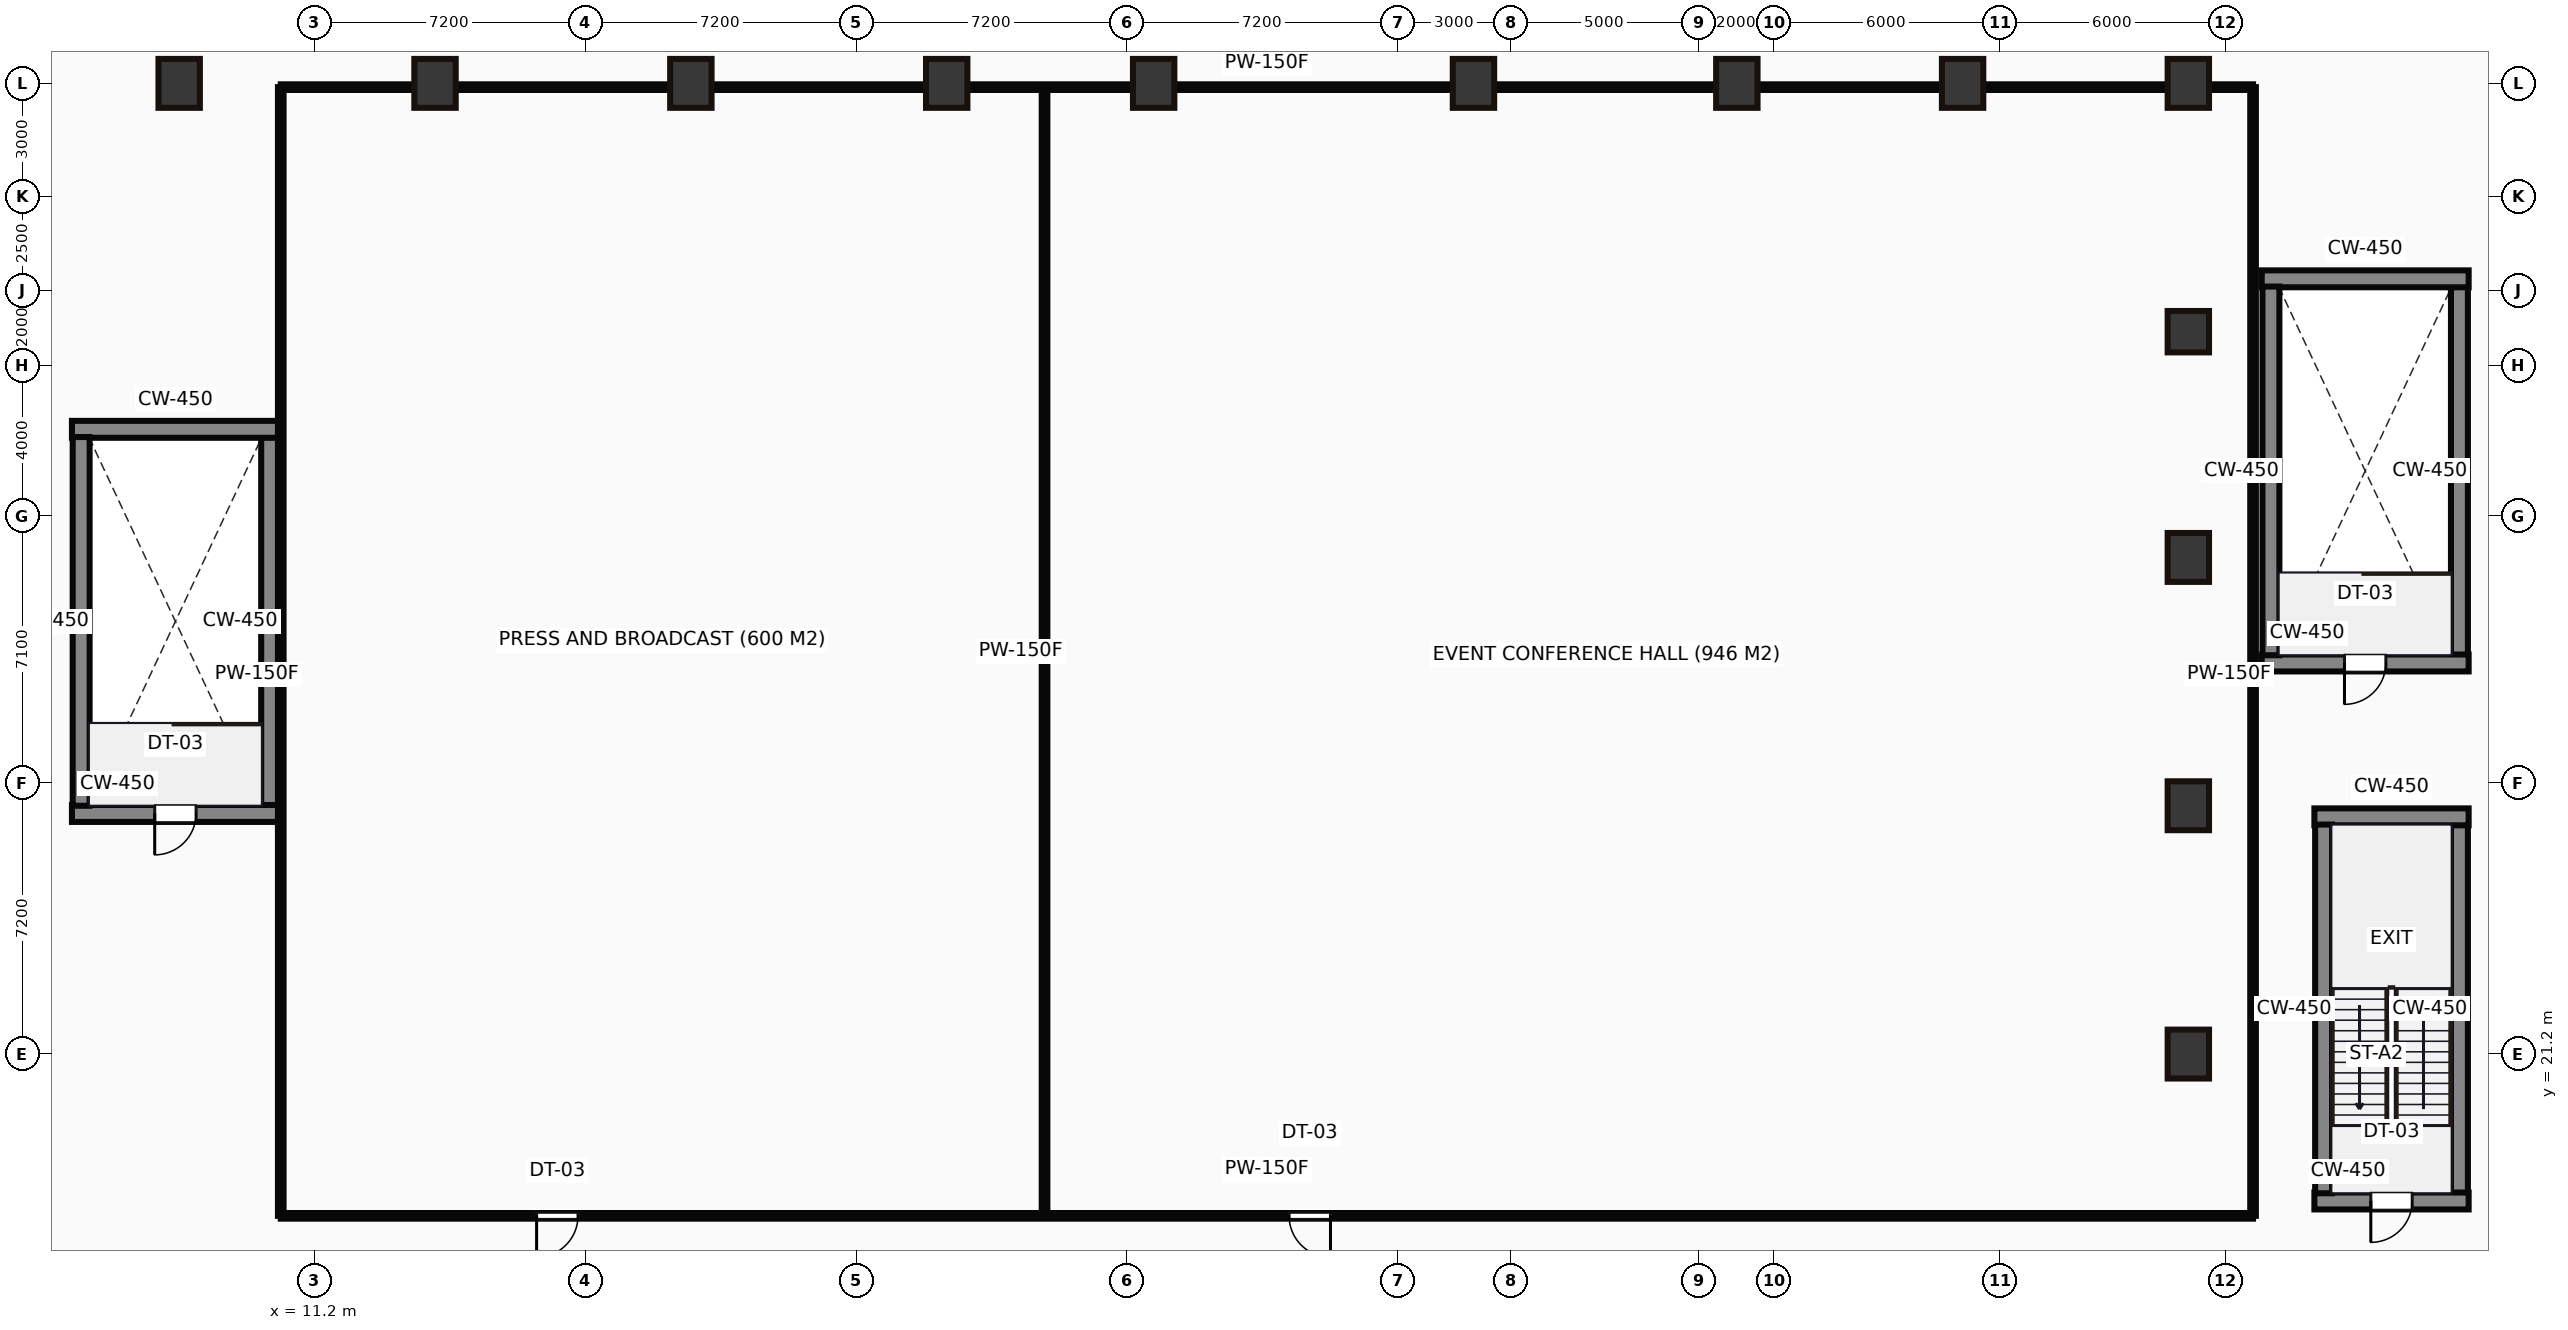
"""IFC4 building model, lengths in metres.
Left out: names, types, materials, properties, quantities, classifications, styles, units other than length and angle.
Written with IfcOpenShell. Run it as: python <this file> out.ifc"""

import sys

from ifc_helpers import new_model, si_unit, direction, frame, frame_2d, origin, origin_2d, place, context, subcontext, project, spatial, rectangle, hollow_rectangle, extrude, source, transform, mapped, element, fill, save


model = new_model("IFC4")
c1 = context("Model", 3, precision=1e-05, world=origin(), true_north=direction((0.0, 1.0)))
c2 = subcontext(c1, "Body", "Model", "MODEL_VIEW")
j1 = project(units=[si_unit("LENGTHUNIT", "METRE"), si_unit("PLANEANGLEUNIT", "RADIAN")], contexts=[c1])
p1 = place(None, origin())
s1 = spatial("IfcSite", under=j1, at=p1, CompositionType="ELEMENT")
p2 = place(p1, origin())
s2 = spatial("IfcBuilding", under=s1, at=p2, CompositionType="ELEMENT")
p3 = place(p2, frame((0.0, 0.0, 21.0)))
s3 = spatial("IfcBuildingStorey", under=s2, at=p3, CompositionType="ELEMENT", Elevation=21.0)
m1 = source(origin(), c2, "Body", "SweptSolid", [
    extrude(hollow_rectangle(XDim=1.1, YDim=1.3, WallThickness=0.055, at=origin_2d()), origin(), (0.0, 0.0, 1.0), 5.0),
])
for number, where, z_axis, x_axis in (
    (1, (7.6, 47.0, 0.0), (0.0, 0.0, 1.0), (1.0, 0.0, 0.0)),
    (2, (14.4, 47.0, 0.0), (0.0, 0.0, 1.0), (1.0, 0.0, 0.0)),
    (3, (21.2, 47.0, 0.0), (0.0, 0.0, 1.0), (1.0, 0.0, 0.0)),
    (4, (28.0, 47.0, 0.0), (0.0, 0.0, 1.0), (1.0, 0.0, 0.0)),
    (5, (33.5, 47.0, 0.0), (0.0, 0.0, 1.0), (1.0, 0.0, 0.0)),
    (6, (42.0, 47.0, 0.0), (0.0, 0.0, 1.0), (1.0, 0.0, 0.0)),
    (7, (49.0, 47.0, 0.0), (0.0, 0.0, 1.0), (1.0, 0.0, 0.0)),
    (8, (55.0, 47.0, 0.0), (0.0, 0.0, 1.0), (1.0, 0.0, 0.0)),
    (9, (61.0, 47.0, 0.0), (0.0, 0.0, 1.0), (1.0, 0.0, 0.0)),
    (10, (61.0, 21.2, 0.0), (0.0, 0.0, 1.0), (1.0, 0.0, 0.0)),
    (11, (61.0, 27.8, 0.0), (0.0, 0.0, 1.0), (1.0, 0.0, 0.0)),
    (12, (61.0, 34.4, 0.0), (0.0, 0.0, 1.0), (1.0, 0.0, 0.0)),
):
    element("IfcColumn", number, at=place(p3, frame(where, z_axis=z_axis, x_axis=x_axis)), inside=s3, PredefinedType="PILASTER", context=c2, shape_type="MappedRepresentation", body=[
        mapped(m1, transform((0.0, 0.0, 0.0))),
    ])
m2 = source(origin(), c2, "Body", "SweptSolid", [
    extrude(hollow_rectangle(XDim=1.1, YDim=1.1, WallThickness=0.05, at=origin_2d()), origin(), (0.0, 0.0, 1.0), 5.0),
])
p4 = place(p3, frame((61.0, 40.4, 0.0), z_axis=(0.0, 0.0, 1.0), x_axis=(1.0, 0.0, 0.0)))
e13 = element("IfcColumn", 13, at=p4, inside=s3, PredefinedType="PILASTER", context=c2, shape_type="MappedRepresentation", body=[
    mapped(m2, transform((0.0, 0.0, 0.0))),
])
m3 = source(origin(), c2, "Body", "SweptSolid", [
    extrude(rectangle(XDim=4.1, YDim=0.45, at=frame_2d((2.05, 0.0))), origin(), (0.0, 0.0, 1.0), 5.0),
])
p5 = place(p3, frame((64.35, 17.295, 0.0), z_axis=(0.0, 0.0, 1.0), x_axis=(1.0, 0.0, 0.0)))
e14 = element("IfcWall", 14, at=p5, inside=s3, PredefinedType="SHEAR", context=c2, shape_type="MappedRepresentation", body=[
    mapped(m3, transform((0.0, 0.0, 0.0))),
])
p6 = place(p5, frame((1.5, 0.0, 0.0)))
e15 = element("IfcOpeningElement", 15, at=p6, cuts=e14, PredefinedType="OPENING", context=c2, shape_type="SweptSolid", body=[
    extrude(rectangle(XDim=1.1, YDim=2.15, at=frame_2d((0.55, 1.075))), frame((0.0, 0.235, 0.0), z_axis=(0.0, -1.0, 0.0), x_axis=(1.0, 0.0, 0.0)), (0.0, 0.0, 1.0), 0.47),
])
m4 = source(origin(), c2, "Body", "SweptSolid", [
    extrude(rectangle(XDim=9.8, YDim=0.45, at=frame_2d((4.9, 0.0))), origin(), (0.0, 0.0, 1.0), 5.0),
])
for number, where, z_axis, x_axis in (
    (16, (64.595, 17.5, 0.0), (0.0, 0.0, 1.0), (0.0, 1.0, 0.0)),
    (17, (68.205, 17.5, 0.0), (0.0, 0.0, 1.0), (0.0, 1.0, 0.0)),
):
    element("IfcWall", number, at=place(p3, frame(where, z_axis=z_axis, x_axis=x_axis)), inside=s3, PredefinedType="SHEAR", context=c2, shape_type="MappedRepresentation", body=[
        mapped(m4, transform((0.0, 0.0, 0.0))),
    ])
p7 = place(p3, frame((64.35, 27.505, 0.0), z_axis=(0.0, 0.0, 1.0), x_axis=(1.0, 0.0, 0.0)))
e18 = element("IfcWall", 18, at=p7, inside=s3, PredefinedType="SHEAR", context=c2, shape_type="MappedRepresentation", body=[
    mapped(m3, transform((0.0, 0.0, 0.0))),
])
m5 = source(origin(), c2, "Body", "SweptSolid", [
    extrude(rectangle(XDim=5.5, YDim=0.45, at=frame_2d((2.75, 0.0))), origin(), (0.0, 0.0, 1.0), 4.7),
])
p8 = place(p3, frame((4.75, 27.595, 0.0), z_axis=(0.0, 0.0, 1.0), x_axis=(1.0, 0.0, 0.0)))
e19 = element("IfcWall", 19, at=p8, inside=s3, PredefinedType="SHEAR", context=c2, shape_type="MappedRepresentation", body=[
    mapped(m5, transform((0.0, 0.0, 0.0))),
])
p9 = place(p8, frame((2.2, 0.0, 0.0)))
e20 = element("IfcOpeningElement", 20, at=p9, cuts=e19, PredefinedType="OPENING", context=c2, shape_type="SweptSolid", body=[
    extrude(rectangle(XDim=1.1, YDim=2.15, at=frame_2d((0.55, 1.075))), frame((0.0, 0.235, 0.0), z_axis=(0.0, -1.0, 0.0), x_axis=(1.0, 0.0, 0.0)), (0.0, 0.0, 1.0), 0.47),
])
m6 = source(origin(), c2, "Body", "SweptSolid", [
    extrude(rectangle(XDim=9.8, YDim=0.45, at=frame_2d((4.9, 0.0))), origin(), (0.0, 0.0, 1.0), 4.7),
])
for number, where, z_axis, x_axis in (
    (21, (4.995, 27.8, 0.0), (0.0, 0.0, 1.0), (0.0, 1.0, 0.0)),
    (22, (10.005, 27.8, 0.0), (0.0, 0.0, 1.0), (0.0, 1.0, 0.0)),
):
    element("IfcWall", number, at=place(p3, frame(where, z_axis=z_axis, x_axis=x_axis)), inside=s3, PredefinedType="SHEAR", context=c2, shape_type="MappedRepresentation", body=[
        mapped(m6, transform((0.0, 0.0, 0.0))),
    ])
p10 = place(p3, frame((4.75, 37.805, 0.0), z_axis=(0.0, 0.0, 1.0), x_axis=(1.0, 0.0, 0.0)))
e23 = element("IfcWall", 23, at=p10, inside=s3, PredefinedType="SHEAR", context=c2, shape_type="MappedRepresentation", body=[
    mapped(m5, transform((0.0, 0.0, 0.0))),
])
p11 = place(p3, frame((62.95, 31.595, 0.0), z_axis=(0.0, 0.0, 1.0), x_axis=(1.0, 0.0, 0.0)))
e24 = element("IfcWall", 24, at=p11, inside=s3, PredefinedType="SHEAR", context=c2, shape_type="MappedRepresentation", body=[
    mapped(m5, transform((0.0, 0.0, 0.0))),
])
p12 = place(p11, frame((2.2, 0.0, 0.0)))
e25 = element("IfcOpeningElement", 25, at=p12, cuts=e24, PredefinedType="OPENING", context=c2, shape_type="SweptSolid", body=[
    extrude(rectangle(XDim=1.1, YDim=2.15, at=frame_2d((0.55, 1.075))), frame((0.0, 0.235, 0.0), z_axis=(0.0, -1.0, 0.0), x_axis=(1.0, 0.0, 0.0)), (0.0, 0.0, 1.0), 0.47),
])
for number, where, z_axis, x_axis in (
    (26, (63.195, 31.8, 0.0), (0.0, 0.0, 1.0), (0.0, 1.0, 0.0)),
    (27, (68.205, 31.8, 0.0), (0.0, 0.0, 1.0), (0.0, 1.0, 0.0)),
):
    element("IfcWall", number, at=place(p3, frame(where, z_axis=z_axis, x_axis=x_axis)), inside=s3, PredefinedType="SHEAR", context=c2, shape_type="MappedRepresentation", body=[
        mapped(m6, transform((0.0, 0.0, 0.0))),
    ])
p13 = place(p3, frame((62.95, 41.805, 0.0), z_axis=(0.0, 0.0, 1.0), x_axis=(1.0, 0.0, 0.0)))
e28 = element("IfcWall", 28, at=p13, inside=s3, PredefinedType="SHEAR", context=c2, shape_type="MappedRepresentation", body=[
    mapped(m5, transform((0.0, 0.0, 0.0))),
])
m7 = source(origin(), c2, "Body", "SweptSolid", [
    extrude(rectangle(XDim=52.42, YDim=0.15, at=frame_2d((26.21, 0.0))), origin(), (0.0, 0.0, 1.0), 4.7),
])
p14 = place(p3, frame((10.3, 16.9, 0.0), z_axis=(0.0, 0.0, 1.0), x_axis=(1.0, 0.0, 0.0)))
e29 = element("IfcWall", 29, at=p14, inside=s3, PredefinedType="PARTITIONING", context=c2, shape_type="MappedRepresentation", body=[
    mapped(m7, transform((0.0, 0.0, 0.0))),
])
p15 = place(p14, frame((6.8, 0.0, 0.0)))
e30 = element("IfcOpeningElement", 30, at=p15, cuts=e29, PredefinedType="OPENING", context=c2, shape_type="SweptSolid", body=[
    extrude(rectangle(XDim=1.1, YDim=2.15, at=frame_2d((0.55, 1.075))), frame((0.0, 0.085, 0.0), z_axis=(0.0, -1.0, 0.0), x_axis=(1.0, 0.0, 0.0)), (0.0, 0.0, 1.0), 0.17),
])
p16 = place(p14, frame((26.8, 0.0, 0.0)))
e31 = element("IfcOpeningElement", 31, at=p16, cuts=e29, PredefinedType="OPENING", context=c2, shape_type="SweptSolid", body=[
    extrude(rectangle(XDim=1.1, YDim=2.15, at=frame_2d((0.55, 1.075))), frame((0.0, 0.085, 0.0), z_axis=(0.0, -1.0, 0.0), x_axis=(1.0, 0.0, 0.0)), (0.0, 0.0, 1.0), 0.17),
])
m8 = source(origin(), c2, "Body", "SweptSolid", [
    extrude(rectangle(XDim=52.42, YDim=0.15, at=frame_2d((26.21, 0.0))), origin(), (0.0, 0.0, 1.0), 3.844),
])
p17 = place(p3, frame((10.3, 46.9, 0.0), z_axis=(0.0, 0.0, 1.0), x_axis=(1.0, 0.0, 0.0)))
e32 = element("IfcWall", 32, at=p17, inside=s3, PredefinedType="PARTITIONING", context=c2, shape_type="MappedRepresentation", body=[
    mapped(m8, transform((0.0, 0.0, 0.0))),
])
m9 = source(origin(), c2, "Body", "SweptSolid", [
    extrude(rectangle(XDim=30.0, YDim=0.15, at=frame_2d((15.0, 0.0))), origin(), (0.0, 0.0, 1.0), 4.7),
])
for number, where, z_axis, x_axis in (
    (33, (10.3, 16.9, 0.0), (0.0, 0.0, 1.0), (0.0, 1.0, 0.0)),
    (34, (62.72, 16.9, 0.0), (0.0, 0.0, 1.0), (0.0, 1.0, 0.0)),
    (35, (30.6, 16.9, 0.0), (0.0, 0.0, 1.0), (0.0, 1.0, 0.0)),
):
    element("IfcWall", number, at=place(p3, frame(where, z_axis=z_axis, x_axis=x_axis)), inside=s3, PredefinedType="PARTITIONING", context=c2, shape_type="MappedRepresentation", body=[
        mapped(m9, transform((0.0, 0.0, 0.0))),
    ])
m10 = source(origin(), c2, "Body", "SweptSolid", [
    extrude(rectangle(XDim=1.1, YDim=2.15, at=frame_2d((0.55, 1.075))), frame((0.0, 0.025, 0.0), z_axis=(0.0, -1.0, 0.0), x_axis=(1.0, 0.0, 0.0)), (0.0, 0.0, 1.0), 0.05),
])
p18 = place(p15, origin())
e36 = element("IfcDoor", 36, at=p18, inside=s3, OperationType="SINGLE_SWING_LEFT", PredefinedType="DOOR", context=c2, shape_type="MappedRepresentation", body=[
    mapped(m10, transform((0.0, 0.0, 0.0))),
])
fill(e30, e36)
p19 = place(p16, origin())
e37 = element("IfcDoor", 37, at=p19, inside=s3, OperationType="SINGLE_SWING_RIGHT", PredefinedType="DOOR", context=c2, shape_type="MappedRepresentation", body=[
    mapped(m10, transform((0.0, 0.0, 0.0))),
])
fill(e31, e37)
p20 = place(p6, origin())
e38 = element("IfcDoor", 38, at=p20, inside=s3, OperationType="SINGLE_SWING_LEFT", PredefinedType="DOOR", context=c2, shape_type="MappedRepresentation", body=[
    mapped(m10, transform((0.0, 0.0, 0.0))),
])
fill(e15, e38)
p21 = place(p9, origin())
e39 = element("IfcDoor", 39, at=p21, inside=s3, OperationType="SINGLE_SWING_LEFT", PredefinedType="DOOR", context=c2, shape_type="MappedRepresentation", body=[
    mapped(m10, transform((0.0, 0.0, 0.0))),
])
fill(e20, e39)
p22 = place(p12, origin())
e40 = element("IfcDoor", 40, at=p22, inside=s3, OperationType="SINGLE_SWING_LEFT", PredefinedType="DOOR", context=c2, shape_type="MappedRepresentation", body=[
    mapped(m10, transform((0.0, 0.0, 0.0))),
])
fill(e25, e40)
save(model, sys.argv[1])
